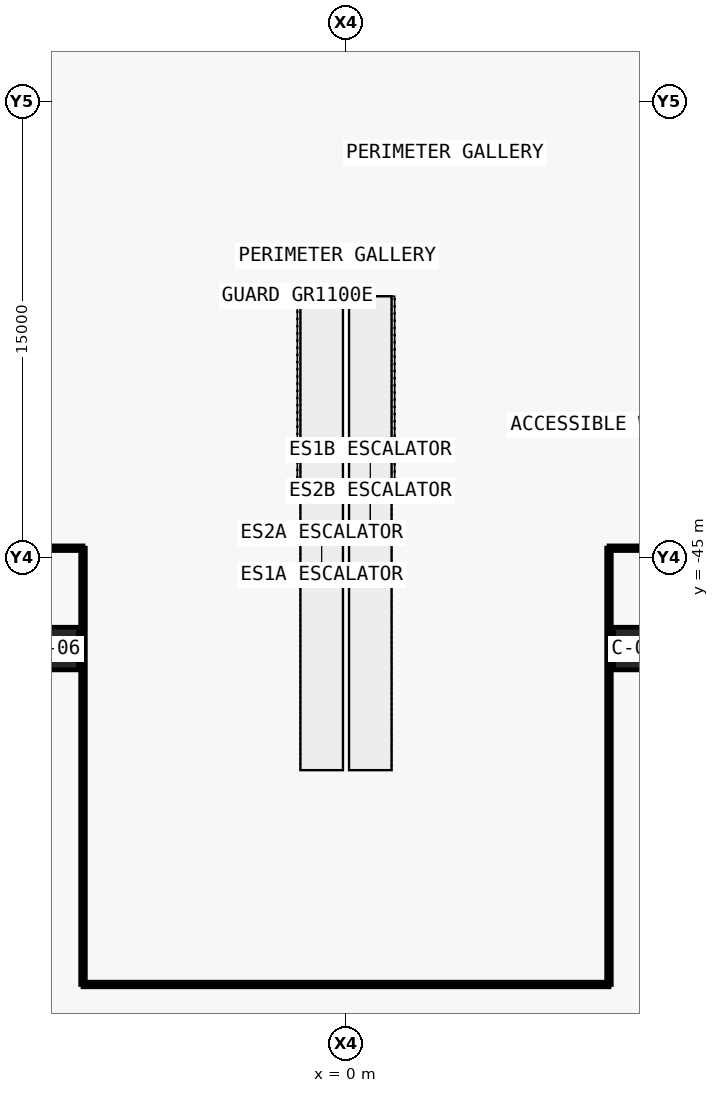
"""IFC4 building model, lengths in metres.
Left out: names, types, materials, properties, quantities, classifications, styles, units other than length and angle.
Written with IfcOpenShell. Run it as: python <this file> out.ifc"""

import sys

from ifc_helpers import new_model, si_unit, direction, frame, frame_2d, origin, origin_2d, place, context, subcontext, project, spatial, rectangle, extrude, element, save


model = new_model("IFC4")
c1 = context("Model", 3, precision=1e-05, world=origin(), true_north=direction((0.0, 1.0)))
c2 = subcontext(c1, "Body", "Model", "MODEL_VIEW")
j1 = project(units=[si_unit("LENGTHUNIT", "METRE"), si_unit("PLANEANGLEUNIT", "RADIAN")], contexts=[c1])
p1 = place(None, origin())
s1 = spatial("IfcSite", under=j1, at=p1, CompositionType="ELEMENT")
p2 = place(p1, origin())
s2 = spatial("IfcBuilding", under=s1, at=p2, CompositionType="ELEMENT")
p3 = place(p2, frame((0.0, 0.0, 9.0)))
s3 = spatial("IfcBuildingStorey", under=s2, at=p3, CompositionType="ELEMENT", Elevation=9.0)
for number, where, z_axis, x_axis in (
    (1, (-9.5, -48.0, 0.0), (0.0, 0.0, 1.0), (1.0, 0.0, 0.0)),
    (2, (9.5, -48.0, 0.0), (0.0, 0.0, 1.0), (1.0, 0.0, 0.0)),
):
    element("IfcColumn", number, at=place(p3, frame(where, z_axis=z_axis, x_axis=x_axis)), inside=s3, PredefinedType="COLUMN", context=c2, shape_type="SweptSolid", body=[
        extrude(rectangle(XDim=1.4, YDim=1.4, at=origin_2d()), origin(), (0.0, 0.0, 1.0), 9.0),
    ])
for number, where, z_axis, x_axis in (
    (3, (36.599, -44.699, 0.0), (0.0, 0.0, 1.0), (-1.0, 0.0, 0.0)),
    (4, (-8.651, -44.699, 0.0), (0.0, 0.0, 1.0), (-1.0, 0.0, 0.0)),
):
    element("IfcWall", number, at=place(p3, frame(where, z_axis=z_axis, x_axis=x_axis)), inside=s3, PredefinedType="PARTITIONING", context=c2, shape_type="SweptSolid", body=[
        extrude(rectangle(XDim=27.948, YDim=0.15, at=frame_2d((13.974, 0.0))), origin(), (0.0, 0.0, 1.0), 7.58),
    ])
p4 = place(p3, frame((8.65, -59.05, 0.0), z_axis=(0.0, 0.0, 1.0), x_axis=(-1.0, 0.0, 0.0)))
e5 = element("IfcWall", 5, at=p4, inside=s3, PredefinedType="PARTITIONING", context=c2, shape_type="SweptSolid", body=[
    extrude(rectangle(XDim=17.3, YDim=0.15, at=frame_2d((8.65, 0.0))), origin(), (0.0, 0.0, 1.0), 8.6),
])
for number, where, z_axis, x_axis in (
    (6, (-8.65, -59.05, 0.0), (0.0, 0.0, 1.0), (0.0, 1.0, 0.0)),
    (7, (8.65, -44.698, 0.0), (0.0, 0.0, 1.0), (0.0, -1.0, 0.0)),
):
    element("IfcWall", number, at=place(p3, frame(where, z_axis=z_axis, x_axis=x_axis)), inside=s3, PredefinedType="PARTITIONING", context=c2, shape_type="SweptSolid", body=[
        extrude(rectangle(XDim=14.352, YDim=0.15, at=frame_2d((7.176, 0.0))), origin(), (0.0, 0.0, 1.0), 7.58),
    ])
save(model, sys.argv[1])
